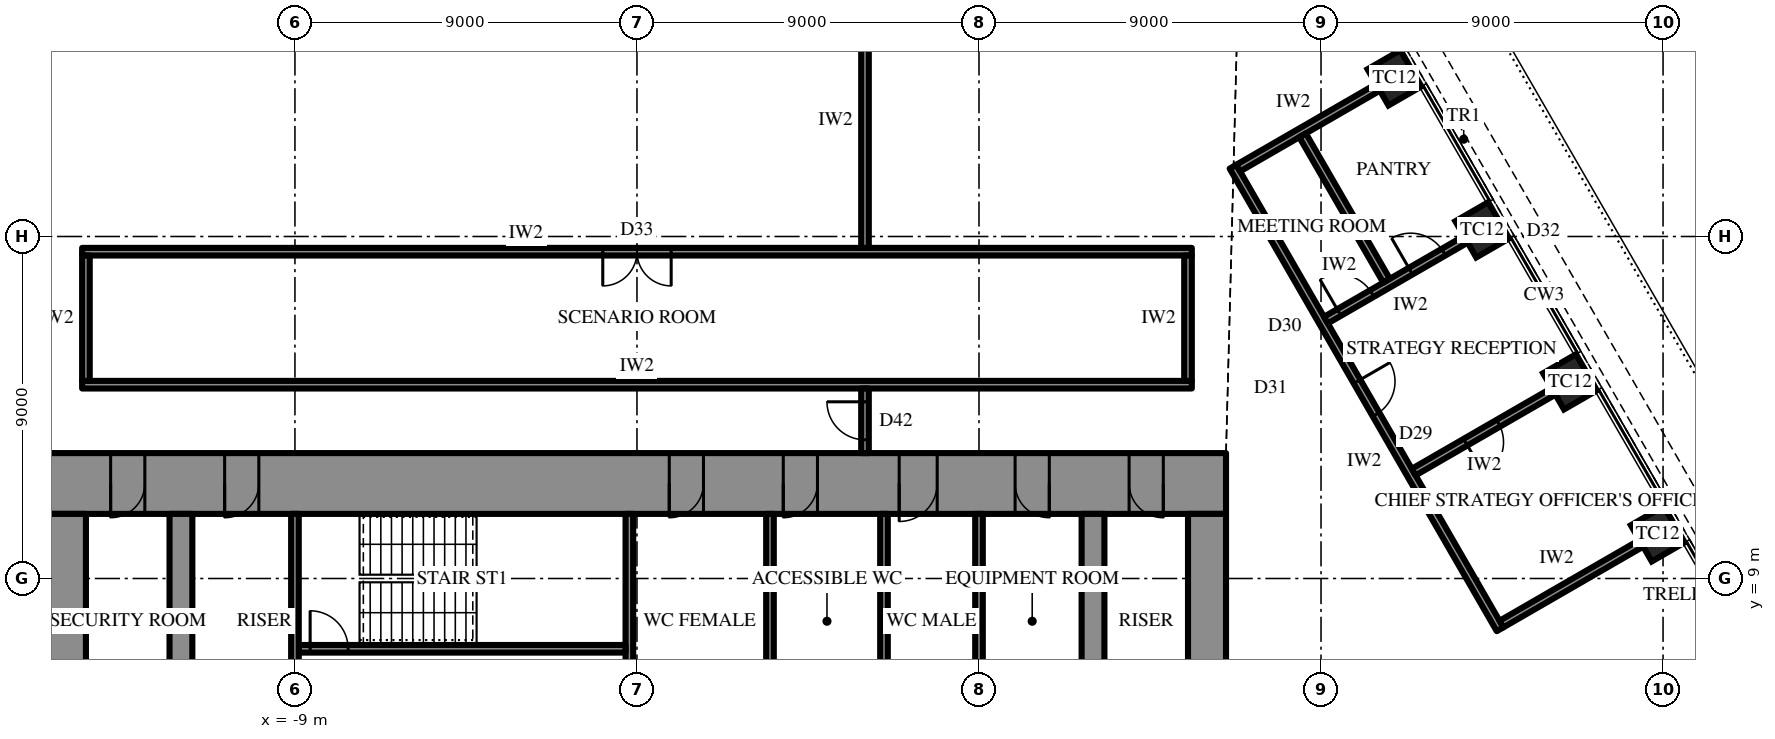
"""IFC4 building model, lengths in metres.
Left out: names, types, materials, properties, quantities, classifications, styles, units other than length and angle.
Written with IfcOpenShell. Run it as: python <this file> out.ifc"""

import sys

from ifc_helpers import new_model, si_unit, direction, frame, frame_2d, origin, origin_2d, place, context, subcontext, project, spatial, rectangle, extrude, element, fill, save


model = new_model("IFC4")
c1 = context("Model", 3, precision=1e-05, world=origin(), true_north=direction((0.0, 1.0)))
c2 = subcontext(c1, "Body", "Model", "MODEL_VIEW")
j1 = project(units=[si_unit("LENGTHUNIT", "METRE"), si_unit("PLANEANGLEUNIT", "RADIAN")], contexts=[c1])
p1 = place(None, origin())
s1 = spatial("IfcSite", under=j1, at=p1, CompositionType="ELEMENT")
p2 = place(p1, origin())
s2 = spatial("IfcBuilding", under=s1, at=p2, CompositionType="ELEMENT")
p3 = place(p2, frame((0.0, 0.0, 291.1)))
s3 = spatial("IfcBuildingStorey", under=s2, at=p3, CompositionType="ELEMENT", Elevation=291.1)
for number, where, z_axis, x_axis in (
    (1, (26.861, 10.175, 0.0), (0.0, 0.0, 1.0), (-0.5, 0.866, 0.0)),
    (2, (24.552, 14.175, 0.0), (0.0, 0.0, 1.0), (-0.5, 0.866, 0.0)),
    (3, (22.242, 18.175, 0.0), (0.0, 0.0, 1.0), (-0.5, 0.866, 0.0)),
    (4, (19.933, 22.175, 0.0), (0.0, 0.0, 1.0), (-0.5, 0.866, 0.0)),
):
    element("IfcColumn", number, at=place(p3, frame(where, z_axis=z_axis, x_axis=x_axis)), inside=s3, PredefinedType="COLUMN", context=c2, shape_type="SweptSolid", body=[
        extrude(rectangle(XDim=1.1, YDim=1.0, at=origin_2d()), origin(), (0.0, 0.0, 1.0), 4.2),
    ])
p4 = place(p3, frame((-15.5, 11.5, 0.0), z_axis=(0.0, 0.0, 1.0), x_axis=(1.0, 0.0, 0.0)))
e5 = element("IfcWall", 5, at=p4, inside=s3, PredefinedType="SHEAR", context=c2, shape_type="SweptSolid", body=[
    extrude(rectangle(XDim=31.0, YDim=1.6, at=frame_2d((15.5, 0.0))), origin(), (0.0, 0.0, 1.0), 4.2),
])
p5 = place(p4, frame((16.35, 0.0, 0.0)))
e6 = element("IfcOpeningElement", 6, at=p5, cuts=e5, PredefinedType="OPENING", context=c2, shape_type="SweptSolid", body=[
    extrude(rectangle(XDim=0.9, YDim=2.2, at=frame_2d((0.45, 1.1))), frame((0.0, 0.81, 0.0), z_axis=(0.0, -1.0, 0.0), x_axis=(1.0, 0.0, 0.0)), (0.0, 0.0, 1.0), 1.62),
])
p6 = place(p4, frame((19.35, 0.0, 0.0)))
e7 = element("IfcOpeningElement", 7, at=p6, cuts=e5, PredefinedType="OPENING", context=c2, shape_type="SweptSolid", body=[
    extrude(rectangle(XDim=0.9, YDim=2.2, at=frame_2d((0.45, 1.1))), frame((0.0, 0.81, 0.0), z_axis=(0.0, -1.0, 0.0), x_axis=(1.0, 0.0, 0.0)), (0.0, 0.0, 1.0), 1.62),
])
p7 = place(p4, frame((22.4, 0.0, 0.0)))
e8 = element("IfcOpeningElement", 8, at=p7, cuts=e5, PredefinedType="OPENING", context=c2, shape_type="SweptSolid", body=[
    extrude(rectangle(XDim=1.0, YDim=2.2, at=frame_2d((0.5, 1.1))), frame((0.0, 0.81, 0.0), z_axis=(0.0, -1.0, 0.0), x_axis=(1.0, 0.0, 0.0)), (0.0, 0.0, 1.0), 1.62),
])
p8 = place(p4, frame((1.65, 0.0, 0.0)))
e9 = element("IfcOpeningElement", 9, at=p8, cuts=e5, PredefinedType="OPENING", context=c2, shape_type="SweptSolid", body=[
    extrude(rectangle(XDim=0.9, YDim=2.2, at=frame_2d((0.45, 1.1))), frame((0.0, 0.81, 0.0), z_axis=(0.0, -1.0, 0.0), x_axis=(1.0, 0.0, 0.0)), (0.0, 0.0, 1.0), 1.62),
])
p9 = place(p4, frame((4.65, 0.0, 0.0)))
e10 = element("IfcOpeningElement", 10, at=p9, cuts=e5, PredefinedType="OPENING", context=c2, shape_type="SweptSolid", body=[
    extrude(rectangle(XDim=0.9, YDim=2.2, at=frame_2d((0.45, 1.1))), frame((0.0, 0.81, 0.0), z_axis=(0.0, -1.0, 0.0), x_axis=(1.0, 0.0, 0.0)), (0.0, 0.0, 1.0), 1.62),
])
p10 = place(p4, frame((25.45, 0.0, 0.0)))
e11 = element("IfcOpeningElement", 11, at=p10, cuts=e5, PredefinedType="OPENING", context=c2, shape_type="SweptSolid", body=[
    extrude(rectangle(XDim=0.9, YDim=2.2, at=frame_2d((0.45, 1.1))), frame((0.0, 0.81, 0.0), z_axis=(0.0, -1.0, 0.0), x_axis=(1.0, 0.0, 0.0)), (0.0, 0.0, 1.0), 1.62),
])
p11 = place(p4, frame((28.45, 0.0, 0.0)))
e12 = element("IfcOpeningElement", 12, at=p11, cuts=e5, PredefinedType="OPENING", context=c2, shape_type="SweptSolid", body=[
    extrude(rectangle(XDim=0.9, YDim=2.2, at=frame_2d((0.45, 1.1))), frame((0.0, 0.81, 0.0), z_axis=(0.0, -1.0, 0.0), x_axis=(1.0, 0.0, 0.0)), (0.0, 0.0, 1.0), 1.62),
])
p12 = place(p3, frame((15.0, -10.7, 0.0), z_axis=(0.0, 0.0, 1.0), x_axis=(0.0, 1.0, 0.0)))
e13 = element("IfcWall", 13, at=p12, inside=s3, PredefinedType="SHEAR", context=c2, shape_type="SweptSolid", body=[
    extrude(rectangle(XDim=21.4, YDim=1.0, at=frame_2d((10.7, 0.0))), origin(), (0.0, 0.0, 1.0), 4.2),
])
p13 = place(p12, frame((9.8, 0.0, 0.0)))
e14 = element("IfcOpeningElement", 14, at=p13, cuts=e13, PredefinedType="OPENING", context=c2, shape_type="SweptSolid", body=[
    extrude(rectangle(XDim=1.8, YDim=2.4, at=frame_2d((0.9, 1.2))), frame((0.0, 0.51, 0.0), z_axis=(0.0, -1.0, 0.0), x_axis=(1.0, 0.0, 0.0)), (0.0, 0.0, 1.0), 1.02),
])
p14 = place(p3, frame((-15.0, 10.7, 0.0), z_axis=(0.0, 0.0, 1.0), x_axis=(0.0, -1.0, 0.0)))
e15 = element("IfcWall", 15, at=p14, inside=s3, PredefinedType="SHEAR", context=c2, shape_type="SweptSolid", body=[
    extrude(rectangle(XDim=21.4, YDim=1.0, at=frame_2d((10.7, 0.0))), origin(), (0.0, 0.0, 1.0), 4.2),
])
p15 = place(p14, frame((9.8, 0.0, 0.0)))
e16 = element("IfcOpeningElement", 16, at=p15, cuts=e15, PredefinedType="OPENING", context=c2, shape_type="SweptSolid", body=[
    extrude(rectangle(XDim=1.8, YDim=2.4, at=frame_2d((0.9, 1.2))), frame((0.0, 0.51, 0.0), z_axis=(0.0, -1.0, 0.0), x_axis=(1.0, 0.0, 0.0)), (0.0, 0.0, 1.0), 1.02),
])
p16 = place(p3, frame((12.0, -10.7, 0.0), z_axis=(0.0, 0.0, 1.0), x_axis=(0.0, 1.0, 0.0)))
e17 = element("IfcWall", 17, at=p16, inside=s3, PredefinedType="SHEAR", context=c2, shape_type="SweptSolid", body=[
    extrude(rectangle(XDim=21.4, YDim=0.6, at=frame_2d((10.7, 0.0))), origin(), (0.0, 0.0, 1.0), 4.2),
])
p17 = place(p16, frame((9.8, 0.0, 0.0)))
e18 = element("IfcOpeningElement", 18, at=p17, cuts=e17, PredefinedType="OPENING", context=c2, shape_type="SweptSolid", body=[
    extrude(rectangle(XDim=1.8, YDim=2.4, at=frame_2d((0.9, 1.2))), frame((0.0, 0.31, 0.0), z_axis=(0.0, -1.0, 0.0), x_axis=(1.0, 0.0, 0.0)), (0.0, 0.0, 1.0), 0.62),
])
p18 = place(p3, frame((-12.0, -10.7, 0.0), z_axis=(0.0, 0.0, 1.0), x_axis=(0.0, 1.0, 0.0)))
e19 = element("IfcWall", 19, at=p18, inside=s3, PredefinedType="SHEAR", context=c2, shape_type="SweptSolid", body=[
    extrude(rectangle(XDim=21.4, YDim=0.6, at=frame_2d((10.7, 0.0))), origin(), (0.0, 0.0, 1.0), 4.2),
])
p19 = place(p18, frame((9.8, 0.0, 0.0)))
e20 = element("IfcOpeningElement", 20, at=p19, cuts=e19, PredefinedType="OPENING", context=c2, shape_type="SweptSolid", body=[
    extrude(rectangle(XDim=1.8, YDim=2.4, at=frame_2d((0.9, 1.2))), frame((0.0, 0.31, 0.0), z_axis=(0.0, -1.0, 0.0), x_axis=(1.0, 0.0, 0.0)), (0.0, 0.0, 1.0), 0.62),
])
p20 = place(p3, frame((-0.2, 5.05, 0.0), z_axis=(0.0, 0.0, 1.0), x_axis=(0.0, 1.0, 0.0)))
e21 = element("IfcWall", 21, at=p20, inside=s3, PredefinedType="SHEAR", context=c2, shape_type="SweptSolid", body=[
    extrude(rectangle(XDim=5.65, YDim=0.2, at=frame_2d((2.825, 0.0))), origin(), (0.0, 0.0, 1.0), 4.2),
])
p21 = place(p3, frame((-8.9, 7.15, 0.0), z_axis=(0.0, 0.0, 1.0), x_axis=(1.0, 0.0, 0.0)))
e22 = element("IfcWall", 22, at=p21, inside=s3, PredefinedType="SHEAR", context=c2, shape_type="SweptSolid", body=[
    extrude(rectangle(XDim=8.6, YDim=0.2, at=frame_2d((4.3, 0.0))), origin(), (0.0, 0.0, 1.0), 4.2),
])
p22 = place(p21, frame((0.3, 0.0, 0.0)))
e23 = element("IfcOpeningElement", 23, at=p22, cuts=e22, PredefinedType="OPENING", context=c2, shape_type="SweptSolid", body=[
    extrude(rectangle(XDim=1.0, YDim=2.2, at=frame_2d((0.5, 1.1))), frame((0.0, 0.11, 0.0), z_axis=(0.0, -1.0, 0.0), x_axis=(1.0, 0.0, 0.0)), (0.0, 0.0, 1.0), 0.22),
])
for number, where, z_axis, x_axis in (
    (24, (-9.0, 5.05, 0.0), (0.0, 0.0, 1.0), (0.0, 1.0, 0.0)),
    (25, (9.0, 5.05, 0.0), (0.0, 0.0, 1.0), (0.0, 1.0, 0.0)),
    (26, (3.5, 5.05, 0.0), (0.0, 0.0, 1.0), (0.0, 1.0, 0.0)),
    (27, (6.5, 5.05, 0.0), (0.0, 0.0, 1.0), (0.0, 1.0, 0.0)),
):
    element("IfcWall", number, at=place(p3, frame(where, z_axis=z_axis, x_axis=x_axis)), inside=s3, PredefinedType="PARTITIONING", context=c2, shape_type="SweptSolid", body=[
        extrude(rectangle(XDim=5.65, YDim=0.2, at=frame_2d((2.825, 0.0))), origin(), (0.0, 0.0, 1.0), 4.0),
    ])
p23 = place(p3, frame((-14.6, 14.1, 0.0), z_axis=(0.0, 0.0, 1.0), x_axis=(1.0, 0.0, 0.0)))
e28 = element("IfcWall", 28, at=p23, inside=s3, PredefinedType="PARTITIONING", context=c2, shape_type="SweptSolid", body=[
    extrude(rectangle(XDim=29.2, YDim=0.2, at=frame_2d((14.6, 0.0))), origin(), (0.0, 0.0, 1.0), 4.0),
])
p24 = place(p3, frame((-14.6, 17.6, 0.0), z_axis=(0.0, 0.0, 1.0), x_axis=(1.0, 0.0, 0.0)))
e29 = element("IfcWall", 29, at=p24, inside=s3, PredefinedType="PARTITIONING", context=c2, shape_type="SweptSolid", body=[
    extrude(rectangle(XDim=29.2, YDim=0.2, at=frame_2d((14.6, 0.0))), origin(), (0.0, 0.0, 1.0), 4.0),
])
p25 = place(p24, frame((13.7, 0.0, 0.0)))
e30 = element("IfcOpeningElement", 30, at=p25, cuts=e29, PredefinedType="OPENING", context=c2, shape_type="SweptSolid", body=[
    extrude(rectangle(XDim=1.8, YDim=2.4, at=frame_2d((0.9, 1.2))), frame((0.0, 0.11, 0.0), z_axis=(0.0, -1.0, 0.0), x_axis=(1.0, 0.0, 0.0)), (0.0, 0.0, 1.0), 0.22),
])
for number, where, z_axis, x_axis in (
    (31, (-14.5, 14.2, 0.0), (0.0, 0.0, 1.0), (0.0, 1.0, 0.0)),
    (32, (14.5, 14.2, 0.0), (0.0, 0.0, 1.0), (0.0, 1.0, 0.0)),
):
    element("IfcWall", number, at=place(p3, frame(where, z_axis=z_axis, x_axis=x_axis)), inside=s3, PredefinedType="PARTITIONING", context=c2, shape_type="SweptSolid", body=[
        extrude(rectangle(XDim=3.3, YDim=0.2, at=frame_2d((1.65, 0.0))), origin(), (0.0, 0.0, 1.0), 4.0),
    ])
p26 = place(p3, frame((22.711, 7.663, 0.0), z_axis=(0.0, 0.0, 1.0), x_axis=(-0.499989069193, 0.866031714597, 0.0)))
e33 = element("IfcWall", 33, at=p26, inside=s3, PredefinedType="PARTITIONING", context=c2, shape_type="SweptSolid", body=[
    extrude(rectangle(XDim=14.056, YDim=0.2, at=frame_2d((7.028, 0.0))), origin(), (0.0, 0.0, 1.0), 4.0),
])
p27 = place(p26, frame((6.528, 0.0, 0.0)))
e34 = element("IfcOpeningElement", 34, at=p27, cuts=e33, PredefinedType="OPENING", context=c2, shape_type="SweptSolid", body=[
    extrude(rectangle(XDim=1.0, YDim=2.2, at=frame_2d((0.5, 1.1))), frame((0.0, 0.11, 0.0), z_axis=(0.0, -1.0, 0.0), x_axis=(1.0, 0.0, 0.0)), (0.0, 0.0, 1.0), 0.22),
])
p28 = place(p3, frame((22.748, 7.8, 0.0), z_axis=(0.0, 0.0, 1.0), x_axis=(0.866028703517, 0.499994284652, 0.0)))
e35 = element("IfcWall", 35, at=p28, inside=s3, PredefinedType="PARTITIONING", context=c2, shape_type="SweptSolid", body=[
    extrude(rectangle(XDim=4.25, YDim=0.2, at=frame_2d((2.125, 0.0))), origin(), (0.0, 0.0, 1.0), 3.082),
])
p29 = place(p3, frame((20.438, 11.8, 0.0), z_axis=(0.0, 0.0, 1.0), x_axis=(0.866028703517, 0.499994284652, 0.0)))
e36 = element("IfcWall", 36, at=p29, inside=s3, PredefinedType="PARTITIONING", context=c2, shape_type="SweptSolid", body=[
    extrude(rectangle(XDim=4.25, YDim=0.2, at=frame_2d((2.125, 0.0))), origin(), (0.0, 0.0, 1.0), 3.082),
])
p30 = place(p29, frame((1.575, 0.0, 0.0)))
e37 = element("IfcOpeningElement", 37, at=p30, cuts=e36, PredefinedType="OPENING", context=c2, shape_type="SweptSolid", body=[
    extrude(rectangle(XDim=1.0, YDim=2.2, at=frame_2d((0.5, 1.1))), frame((0.0, 0.11, 0.0), z_axis=(0.0, -1.0, 0.0), x_axis=(1.0, 0.0, 0.0)), (0.0, 0.0, 1.0), 0.22),
])
p31 = place(p3, frame((18.129, 15.8, 0.0), z_axis=(0.0, 0.0, 1.0), x_axis=(0.866014341725, 0.50001915956, 0.0)))
e38 = element("IfcWall", 38, at=p31, inside=s3, PredefinedType="PARTITIONING", context=c2, shape_type="SweptSolid", body=[
    extrude(rectangle(XDim=4.25, YDim=0.2, at=frame_2d((2.125, 0.0))), origin(), (0.0, 0.0, 1.0), 3.082),
])
p32 = place(p31, frame((0.4, 0.0, 0.0)))
e39 = element("IfcOpeningElement", 39, at=p32, cuts=e38, PredefinedType="OPENING", context=c2, shape_type="SweptSolid", body=[
    extrude(rectangle(XDim=1.0, YDim=2.2, at=frame_2d((0.5, 1.1))), frame((0.0, 0.11, 0.0), z_axis=(0.0, -1.0, 0.0), x_axis=(1.0, 0.0, 0.0)), (0.0, 0.0, 1.0), 0.22),
])
p33 = place(p31, frame((2.575, 0.0, 0.0)))
e40 = element("IfcOpeningElement", 40, at=p33, cuts=e38, PredefinedType="OPENING", context=c2, shape_type="SweptSolid", body=[
    extrude(rectangle(XDim=1.0, YDim=2.2, at=frame_2d((0.5, 1.1))), frame((0.0, 0.11, 0.0), z_axis=(0.0, -1.0, 0.0), x_axis=(1.0, 0.0, 0.0)), (0.0, 0.0, 1.0), 0.22),
])
p34 = place(p3, frame((15.819, 19.8, 0.0), z_axis=(0.0, 0.0, 1.0), x_axis=(0.866028703517, 0.499994284652, 0.0)))
e41 = element("IfcWall", 41, at=p34, inside=s3, PredefinedType="PARTITIONING", context=c2, shape_type="SweptSolid", body=[
    extrude(rectangle(XDim=4.25, YDim=0.2, at=frame_2d((2.125, 0.0))), origin(), (0.0, 0.0, 1.0), 3.082),
])
p35 = place(p3, frame((19.724, 16.837, 0.0), z_axis=(0.0, 0.0, 1.0), x_axis=(-0.500025355245, 0.866010764432, 0.0)))
e42 = element("IfcWall", 42, at=p35, inside=s3, PredefinedType="PARTITIONING", context=c2, shape_type="SweptSolid", body=[
    extrude(rectangle(XDim=4.419, YDim=0.2, at=frame_2d((2.209, 0.0))), origin(), (0.0, 0.0, 1.0), 4.0),
])
p36 = place(p3, frame((6.0, 12.3, 0.0), z_axis=(0.0, 0.0, 1.0), x_axis=(0.0, 1.0, 0.0)))
e43 = element("IfcWall", 43, at=p36, inside=s3, PredefinedType="PARTITIONING", context=c2, shape_type="SweptSolid", body=[
    extrude(rectangle(XDim=1.7, YDim=0.2, at=frame_2d((0.85, 0.0))), origin(), (0.0, 0.0, 1.0), 4.0),
])
p37 = place(p36, frame((0.35, 0.0, 0.0)))
e44 = element("IfcOpeningElement", 44, at=p37, cuts=e43, PredefinedType="OPENING", context=c2, shape_type="SweptSolid", body=[
    extrude(rectangle(XDim=1.0, YDim=2.2, at=frame_2d((0.5, 1.1))), frame((0.0, 0.11, 0.0), z_axis=(0.0, -1.0, 0.0), x_axis=(1.0, 0.0, 0.0)), (0.0, 0.0, 1.0), 0.22),
])
p38 = place(p3, frame((6.0, 17.7, 0.0), z_axis=(0.0, 0.0, 1.0), x_axis=(0.0, 1.0, 0.0)))
e45 = element("IfcWall", 45, at=p38, inside=s3, PredefinedType="PARTITIONING", context=c2, shape_type="SweptSolid", body=[
    extrude(rectangle(XDim=6.7, YDim=0.2, at=frame_2d((3.35, 0.0))), origin(), (0.0, 0.0, 1.0), 4.0),
])
p39 = place(p22, origin())
e46 = element("IfcDoor", 46, at=p39, inside=s3, OperationType="SINGLE_SWING_RIGHT", PredefinedType="DOOR", context=c2, shape_type="SweptSolid", body=[
    extrude(rectangle(XDim=1.0, YDim=2.2, at=frame_2d((0.5, 1.1))), frame((0.0, 0.025, 0.0), z_axis=(0.0, -1.0, 0.0), x_axis=(1.0, 0.0, 0.0)), (0.0, 0.0, 1.0), 0.05),
])
fill(e23, e46)
p40 = place(p5, frame((0.9, 0.0, 0.0), z_axis=(0.0, 0.0, 1.0), x_axis=(-1.0, 0.0, 0.0)))
e47 = element("IfcDoor", 47, at=p40, inside=s3, OperationType="SINGLE_SWING_LEFT", PredefinedType="DOOR", context=c2, shape_type="SweptSolid", body=[
    extrude(rectangle(XDim=0.9, YDim=2.2, at=frame_2d((0.45, 1.1))), frame((0.0, 0.025, 0.0), z_axis=(0.0, -1.0, 0.0), x_axis=(1.0, 0.0, 0.0)), (0.0, 0.0, 1.0), 0.05),
])
fill(e6, e47)
p41 = place(p6, frame((0.9, 0.0, 0.0), z_axis=(0.0, 0.0, 1.0), x_axis=(-1.0, 0.0, 0.0)))
e48 = element("IfcDoor", 48, at=p41, inside=s3, OperationType="SINGLE_SWING_LEFT", PredefinedType="DOOR", context=c2, shape_type="SweptSolid", body=[
    extrude(rectangle(XDim=0.9, YDim=2.2, at=frame_2d((0.45, 1.1))), frame((0.0, 0.025, 0.0), z_axis=(0.0, -1.0, 0.0), x_axis=(1.0, 0.0, 0.0)), (0.0, 0.0, 1.0), 0.05),
])
fill(e7, e48)
p42 = place(p7, frame((1.0, 0.0, 0.0), z_axis=(0.0, 0.0, 1.0), x_axis=(-1.0, 0.0, 0.0)))
e49 = element("IfcDoor", 49, at=p42, inside=s3, OperationType="SINGLE_SWING_LEFT", PredefinedType="DOOR", context=c2, shape_type="SweptSolid", body=[
    extrude(rectangle(XDim=1.0, YDim=2.2, at=frame_2d((0.5, 1.1))), frame((0.0, 0.025, 0.0), z_axis=(0.0, -1.0, 0.0), x_axis=(1.0, 0.0, 0.0)), (0.0, 0.0, 1.0), 0.05),
])
fill(e8, e49)
p43 = place(p8, frame((0.9, 0.0, 0.0), z_axis=(0.0, 0.0, 1.0), x_axis=(-1.0, 0.0, 0.0)))
e50 = element("IfcDoor", 50, at=p43, inside=s3, OperationType="SINGLE_SWING_LEFT", PredefinedType="DOOR", context=c2, shape_type="SweptSolid", body=[
    extrude(rectangle(XDim=0.9, YDim=2.2, at=frame_2d((0.45, 1.1))), frame((0.0, 0.025, 0.0), z_axis=(0.0, -1.0, 0.0), x_axis=(1.0, 0.0, 0.0)), (0.0, 0.0, 1.0), 0.05),
])
fill(e9, e50)
p44 = place(p9, frame((0.9, 0.0, 0.0), z_axis=(0.0, 0.0, 1.0), x_axis=(-1.0, 0.0, 0.0)))
e51 = element("IfcDoor", 51, at=p44, inside=s3, OperationType="SINGLE_SWING_LEFT", PredefinedType="DOOR", context=c2, shape_type="SweptSolid", body=[
    extrude(rectangle(XDim=0.9, YDim=2.2, at=frame_2d((0.45, 1.1))), frame((0.0, 0.025, 0.0), z_axis=(0.0, -1.0, 0.0), x_axis=(1.0, 0.0, 0.0)), (0.0, 0.0, 1.0), 0.05),
])
fill(e10, e51)
p45 = place(p10, frame((0.9, 0.0, 0.0), z_axis=(0.0, 0.0, 1.0), x_axis=(-1.0, 0.0, 0.0)))
e52 = element("IfcDoor", 52, at=p45, inside=s3, OperationType="SINGLE_SWING_RIGHT", PredefinedType="DOOR", context=c2, shape_type="SweptSolid", body=[
    extrude(rectangle(XDim=0.9, YDim=2.2, at=frame_2d((0.45, 1.1))), frame((0.0, 0.025, 0.0), z_axis=(0.0, -1.0, 0.0), x_axis=(1.0, 0.0, 0.0)), (0.0, 0.0, 1.0), 0.05),
])
fill(e11, e52)
p46 = place(p11, frame((0.9, 0.0, 0.0), z_axis=(0.0, 0.0, 1.0), x_axis=(-1.0, 0.0, 0.0)))
e53 = element("IfcDoor", 53, at=p46, inside=s3, OperationType="SINGLE_SWING_RIGHT", PredefinedType="DOOR", context=c2, shape_type="SweptSolid", body=[
    extrude(rectangle(XDim=0.9, YDim=2.2, at=frame_2d((0.45, 1.1))), frame((0.0, 0.025, 0.0), z_axis=(0.0, -1.0, 0.0), x_axis=(1.0, 0.0, 0.0)), (0.0, 0.0, 1.0), 0.05),
])
fill(e12, e53)
p47 = place(p25, frame((1.8, 0.0, 0.0), z_axis=(0.0, 0.0, 1.0), x_axis=(-1.0, 0.0, 0.0)))
e54 = element("IfcDoor", 54, at=p47, inside=s3, OperationType="DOUBLE_DOOR_SINGLE_SWING", PredefinedType="DOOR", context=c2, shape_type="SweptSolid", body=[
    extrude(rectangle(XDim=1.8, YDim=2.4, at=frame_2d((0.9, 1.2))), frame((0.0, 0.025, 0.0), z_axis=(0.0, -1.0, 0.0), x_axis=(1.0, 0.0, 0.0)), (0.0, 0.0, 1.0), 0.05),
])
fill(e30, e54)
p48 = place(p30, frame((1.0, 0.0, 0.0), z_axis=(0.0, 0.0, 1.0), x_axis=(-1.0, 0.0, 0.0)))
e55 = element("IfcDoor", 55, at=p48, inside=s3, OperationType="SINGLE_SWING_LEFT", PredefinedType="DOOR", context=c2, shape_type="SweptSolid", body=[
    extrude(rectangle(XDim=1.0, YDim=2.2, at=frame_2d((0.5, 1.1))), frame((0.0, 0.025, 0.0), z_axis=(0.0, -1.0, 0.0), x_axis=(1.0, 0.0, 0.0)), (0.0, 0.0, 1.0), 0.05),
])
fill(e37, e55)
p49 = place(p27, frame((1.0, 0.0, 0.0), z_axis=(0.0, 0.0, 1.0), x_axis=(-1.0, 0.0, 0.0)))
e56 = element("IfcDoor", 56, at=p49, inside=s3, OperationType="SINGLE_SWING_RIGHT", PredefinedType="DOOR", context=c2, shape_type="SweptSolid", body=[
    extrude(rectangle(XDim=1.0, YDim=2.2, at=frame_2d((0.5, 1.1))), frame((0.0, 0.025, 0.0), z_axis=(0.0, -1.0, 0.0), x_axis=(1.0, 0.0, 0.0)), (0.0, 0.0, 1.0), 0.05),
])
fill(e34, e56)
p50 = place(p32, origin())
e57 = element("IfcDoor", 57, at=p50, inside=s3, OperationType="SINGLE_SWING_RIGHT", PredefinedType="DOOR", context=c2, shape_type="SweptSolid", body=[
    extrude(rectangle(XDim=1.0, YDim=2.2, at=frame_2d((0.5, 1.1))), frame((0.0, 0.025, 0.0), z_axis=(0.0, -1.0, 0.0), x_axis=(1.0, 0.0, 0.0)), (0.0, 0.0, 1.0), 0.05),
])
fill(e39, e57)
p51 = place(p33, origin())
e58 = element("IfcDoor", 58, at=p51, inside=s3, OperationType="SINGLE_SWING_RIGHT", PredefinedType="DOOR", context=c2, shape_type="SweptSolid", body=[
    extrude(rectangle(XDim=1.0, YDim=2.2, at=frame_2d((0.5, 1.1))), frame((0.0, 0.025, 0.0), z_axis=(0.0, -1.0, 0.0), x_axis=(1.0, 0.0, 0.0)), (0.0, 0.0, 1.0), 0.05),
])
fill(e40, e58)
p52 = place(p37, origin())
e59 = element("IfcDoor", 59, at=p52, inside=s3, OperationType="SINGLE_SWING_LEFT", PredefinedType="DOOR", context=c2, shape_type="SweptSolid", body=[
    extrude(rectangle(XDim=1.0, YDim=2.2, at=frame_2d((0.5, 1.1))), frame((0.0, 0.025, 0.0), z_axis=(0.0, -1.0, 0.0), x_axis=(1.0, 0.0, 0.0)), (0.0, 0.0, 1.0), 0.05),
])
fill(e44, e59)
save(model, sys.argv[1])
